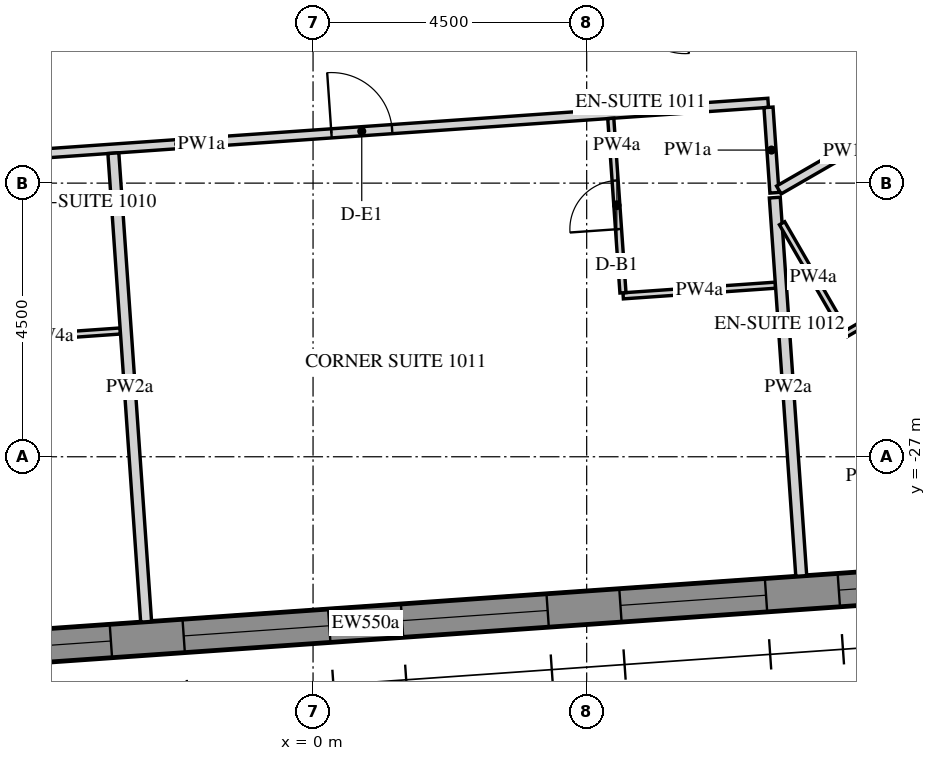
"""IFC4 building model, lengths in metres.
Left out: names, types, materials, properties, quantities, classifications, styles, units other than length and angle.
Written with IfcOpenShell. Run it as: python <this file> out.ifc"""

import sys

from ifc_helpers import new_model, si_unit, direction, frame, frame_2d, origin, place, context, subcontext, project, spatial, polyline, rectangle, outline, extrude, element, fill, save


model = new_model("IFC4")
c1 = context("Model", 3, precision=1e-05, world=origin(), true_north=direction((0.0, 1.0)))
c2 = subcontext(c1, "Body", "Model", "MODEL_VIEW")
j1 = project(units=[si_unit("LENGTHUNIT", "METRE"), si_unit("PLANEANGLEUNIT", "RADIAN")], contexts=[c1])
p1 = place(None, origin())
s1 = spatial("IfcSite", under=j1, at=p1, CompositionType="ELEMENT")
p2 = place(p1, origin())
s2 = spatial("IfcBuilding", under=s1, at=p2, CompositionType="ELEMENT")
p3 = place(p2, frame((0.0, 0.0, 142.8)))
s3 = spatial("IfcBuildingStorey", under=s2, at=p3, CompositionType="ELEMENT", Elevation=142.8)
p4 = place(p3, frame((-14.134, -30.786, -0.15), z_axis=(0.0, 0.0, 1.0), x_axis=(0.997564037441, 0.069756657061, 0.0)))
e1 = element("IfcWall", 1, at=p4, inside=s3, PredefinedType="SOLIDWALL", context=c2, shape_type="SweptSolid", body=[
    extrude(outline(polyline([(-0.026, -0.275), (30.094, -0.275), (30.049, 0.275), (0.026, 0.275), (-0.026, -0.275)])), origin(), (0.0, 0.0, 1.0), 3.75),
])
p5 = place(p4, frame((1.236, 0.0, 1.05)))
e2 = element("IfcOpeningElement", 2, at=p5, cuts=e1, PredefinedType="OPENING", context=c2, shape_type="SweptSolid", body=[
    extrude(rectangle(XDim=2.4, YDim=2.4, at=frame_2d((1.2, 1.2))), frame((0.0, 0.285, 0.0), z_axis=(0.0, -1.0, 0.0), x_axis=(1.0, 0.0, 0.0)), (0.0, 0.0, 1.0), 0.57),
])
p6 = place(p4, frame((4.835, 0.0, 1.05)))
e3 = element("IfcOpeningElement", 3, at=p6, cuts=e1, PredefinedType="OPENING", context=c2, shape_type="SweptSolid", body=[
    extrude(rectangle(XDim=2.4, YDim=2.4, at=frame_2d((1.2, 1.2))), frame((0.0, 0.285, 0.0), z_axis=(0.0, -1.0, 0.0), x_axis=(1.0, 0.0, 0.0)), (0.0, 0.0, 1.0), 0.57),
])
p7 = place(p4, frame((8.436, 0.0, 1.05)))
e4 = element("IfcOpeningElement", 4, at=p7, cuts=e1, PredefinedType="OPENING", context=c2, shape_type="SweptSolid", body=[
    extrude(rectangle(XDim=2.4, YDim=2.4, at=frame_2d((1.2, 1.2))), frame((0.0, 0.285, 0.0), z_axis=(0.0, -1.0, 0.0), x_axis=(1.0, 0.0, 0.0)), (0.0, 0.0, 1.0), 0.57),
])
p8 = place(p4, frame((12.035, 0.0, 1.05)))
e5 = element("IfcOpeningElement", 5, at=p8, cuts=e1, PredefinedType="OPENING", context=c2, shape_type="SweptSolid", body=[
    extrude(rectangle(XDim=2.4, YDim=2.4, at=frame_2d((1.2, 1.2))), frame((0.0, 0.285, 0.0), z_axis=(0.0, -1.0, 0.0), x_axis=(1.0, 0.0, 0.0)), (0.0, 0.0, 1.0), 0.57),
])
p9 = place(p4, frame((15.635, 0.0, 1.05)))
e6 = element("IfcOpeningElement", 6, at=p9, cuts=e1, PredefinedType="OPENING", context=c2, shape_type="SweptSolid", body=[
    extrude(rectangle(XDim=2.4, YDim=2.4, at=frame_2d((1.2, 1.2))), frame((0.0, 0.285, 0.0), z_axis=(0.0, -1.0, 0.0), x_axis=(1.0, 0.0, 0.0)), (0.0, 0.0, 1.0), 0.57),
])
p10 = place(p4, frame((19.236, 0.0, 1.05)))
e7 = element("IfcOpeningElement", 7, at=p10, cuts=e1, PredefinedType="OPENING", context=c2, shape_type="SweptSolid", body=[
    extrude(rectangle(XDim=2.4, YDim=2.4, at=frame_2d((1.2, 1.2))), frame((0.0, 0.285, 0.0), z_axis=(0.0, -1.0, 0.0), x_axis=(1.0, 0.0, 0.0)), (0.0, 0.0, 1.0), 0.57),
])
p11 = place(p4, frame((22.835, 0.0, 1.05)))
e8 = element("IfcOpeningElement", 8, at=p11, cuts=e1, PredefinedType="OPENING", context=c2, shape_type="SweptSolid", body=[
    extrude(rectangle(XDim=2.4, YDim=2.4, at=frame_2d((1.2, 1.2))), frame((0.0, 0.285, 0.0), z_axis=(0.0, -1.0, 0.0), x_axis=(1.0, 0.0, 0.0)), (0.0, 0.0, 1.0), 0.57),
])
p12 = place(p4, frame((26.436, 0.0, 1.05)))
e9 = element("IfcOpeningElement", 9, at=p12, cuts=e1, PredefinedType="OPENING", context=c2, shape_type="SweptSolid", body=[
    extrude(rectangle(XDim=2.4, YDim=2.4, at=frame_2d((1.2, 1.2))), frame((0.0, 0.285, 0.0), z_axis=(0.0, -1.0, 0.0), x_axis=(1.0, 0.0, 0.0)), (0.0, 0.0, 1.0), 0.57),
])
p13 = place(p3, frame((8.083, -14.0, -0.15), z_axis=(0.0, 0.0, 1.0), x_axis=(0.499997680643, -0.866026742862, 0.0)))
e10 = element("IfcWall", 10, at=p13, inside=s3, PredefinedType="SHEAR", context=c2, shape_type="SweptSolid", body=[
    extrude(rectangle(XDim=16.509, YDim=0.6, at=frame_2d((8.254, 0.0))), origin(), (0.0, 0.0, 1.0), 3.75),
])
p14 = place(p13, frame((7.354, 0.0, 0.15)))
e11 = element("IfcOpeningElement", 11, at=p14, cuts=e10, PredefinedType="OPENING", context=c2, shape_type="SweptSolid", body=[
    extrude(rectangle(XDim=1.8, YDim=2.4, at=frame_2d((0.9, 1.2))), frame((0.0, 0.31, 0.0), z_axis=(0.0, -1.0, 0.0), x_axis=(1.0, 0.0, 0.0)), (0.0, 0.0, 1.0), 0.62),
])
p15 = place(p3, frame((-11.902, -22.535, 0.0), z_axis=(0.0, 0.0, 1.0), x_axis=(0.997563830208, 0.069759620556, 0.0)))
e12 = element("IfcWall", 12, at=p15, inside=s3, PredefinedType="PARTITIONING", context=c2, shape_type="SweptSolid", body=[
    extrude(rectangle(XDim=19.434, YDim=0.15, at=frame_2d((9.717, 0.0))), origin(), (0.0, 0.0, 1.0), 2.838),
])
p16 = place(p15, frame((2.575, 0.0, 0.0)))
e13 = element("IfcOpeningElement", 13, at=p16, cuts=e12, PredefinedType="OPENING", context=c2, shape_type="SweptSolid", body=[
    extrude(rectangle(XDim=1.0, YDim=2.1, at=frame_2d((0.5, 1.05))), frame((0.0, 0.085, 0.0), z_axis=(0.0, -1.0, 0.0), x_axis=(1.0, 0.0, 0.0)), (0.0, 0.0, 1.0), 0.17),
])
p17 = place(p15, frame((12.234, 0.0, 0.0)))
e14 = element("IfcOpeningElement", 14, at=p17, cuts=e12, PredefinedType="OPENING", context=c2, shape_type="SweptSolid", body=[
    extrude(rectangle(XDim=1.0, YDim=2.1, at=frame_2d((0.5, 1.05))), frame((0.0, 0.085, 0.0), z_axis=(0.0, -1.0, 0.0), x_axis=(1.0, 0.0, 0.0)), (0.0, 0.0, 1.0), 0.17),
])
p18 = place(p3, frame((7.49, -21.254, 0.0), z_axis=(0.0, 0.0, 1.0), x_axis=(0.069718673592, -0.997566692784, 0.0)))
e15 = element("IfcWall", 15, at=p18, inside=s3, PredefinedType="PARTITIONING", context=c2, shape_type="SweptSolid", body=[
    extrude(rectangle(XDim=1.408, YDim=0.15, at=frame_2d((0.704, 0.0))), origin(), (0.0, 0.0, 1.0), 2.838),
])
p19 = place(p3, frame((7.66, -22.613, 0.0), z_axis=(0.0, 0.0, 1.0), x_axis=(0.866003870164, 0.500037295471, 0.0)))
e16 = element("IfcWall", 16, at=p19, inside=s3, PredefinedType="PARTITIONING", context=c2, shape_type="SweptSolid", body=[
    extrude(rectangle(XDim=2.573, YDim=0.15, at=frame_2d((1.287, 0.0))), origin(), (0.0, 0.0, 1.0), 2.838),
])
p20 = place(p3, frame((-0.825, -19.956, 0.0), z_axis=(0.0, 0.0, 1.0), x_axis=(-0.997562587881, -0.069777383582, 0.0)))
e17 = element("IfcWall", 17, at=p20, inside=s3, PredefinedType="PARTITIONING", context=c2, shape_type="SweptSolid", body=[
    extrude(rectangle(XDim=10.189, YDim=0.15, at=frame_2d((5.094, 0.0))), origin(), (0.0, 0.0, 1.0), 2.838),
])
p21 = place(p3, frame((-3.17, -24.932, 0.0), z_axis=(0.0, 0.0, 1.0), x_axis=(-0.997564338377, -0.069752353356, 0.0)))
e18 = element("IfcWall", 18, at=p21, inside=s3, PredefinedType="PARTITIONING", context=c2, shape_type="SweptSolid", body=[
    extrude(rectangle(XDim=2.31, YDim=0.1, at=frame_2d((1.155, 0.0))), origin(), (0.0, 0.0, 1.0), 2.838),
])
p22 = place(p3, frame((-2.745, -29.714, 0.0), z_axis=(0.0, 0.0, 1.0), x_axis=(-0.069748931501, 0.997564577636, 0.0)))
e19 = element("IfcWall", 19, at=p22, inside=s3, PredefinedType="PARTITIONING", context=c2, shape_type="SweptSolid", body=[
    extrude(rectangle(XDim=7.725, YDim=0.18, at=frame_2d((3.863, 0.0))), origin(), (0.0, 0.0, 1.0), 2.838),
])
p23 = place(p3, frame((7.604, -24.178, 0.0), z_axis=(0.0, 0.0, 1.0), x_axis=(-0.997565196586, -0.069740078583, 0.0)))
e20 = element("IfcWall", 20, at=p23, inside=s3, PredefinedType="PARTITIONING", context=c2, shape_type="SweptSolid", body=[
    extrude(rectangle(XDim=2.51, YDim=0.1, at=frame_2d((1.255, 0.0))), origin(), (0.0, 0.0, 1.0), 2.838),
])
p24 = place(p3, frame((5.097, -24.304, 0.0), z_axis=(0.0, 0.0, 1.0), x_axis=(-0.069804620828, 0.99756068232, 0.0)))
e21 = element("IfcWall", 21, at=p24, inside=s3, PredefinedType="PARTITIONING", context=c2, shape_type="SweptSolid", body=[
    extrude(rectangle(XDim=2.875, YDim=0.1, at=frame_2d((1.438, 0.0))), origin(), (0.0, 0.0, 1.0), 2.838),
])
p25 = place(p24, frame((1.05, 0.0, 0.0)))
e22 = element("IfcOpeningElement", 22, at=p25, cuts=e21, PredefinedType="OPENING", context=c2, shape_type="SweptSolid", body=[
    extrude(rectangle(XDim=0.8, YDim=2.1, at=frame_2d((0.4, 1.05))), frame((0.0, 0.06, 0.0), z_axis=(0.0, -1.0, 0.0), x_axis=(1.0, 0.0, 0.0)), (0.0, 0.0, 1.0), 0.12),
])
p26 = place(p3, frame((8.029, -28.96, 0.0), z_axis=(0.0, 0.0, 1.0), x_axis=(-0.069750446855, 0.997564471683, 0.0)))
e23 = element("IfcWall", 23, at=p26, inside=s3, PredefinedType="PARTITIONING", context=c2, shape_type="SweptSolid", body=[
    extrude(rectangle(XDim=6.237, YDim=0.18, at=frame_2d((3.119, 0.0))), origin(), (0.0, 0.0, 1.0), 2.838),
])
p27 = place(p3, frame((11.123, -23.616, 0.0), z_axis=(0.0, 0.0, 1.0), x_axis=(-0.866034909742, -0.499983534837, 0.0)))
e24 = element("IfcWall", 24, at=p27, inside=s3, PredefinedType="PARTITIONING", context=c2, shape_type="SweptSolid", body=[
    extrude(rectangle(XDim=2.725, YDim=0.1, at=frame_2d((1.363, 0.0))), origin(), (0.0, 0.0, 1.0), 2.838),
])
p28 = place(p27, frame((1.065, 0.0, 0.0)))
e25 = element("IfcOpeningElement", 25, at=p28, cuts=e24, PredefinedType="OPENING", context=c2, shape_type="SweptSolid", body=[
    extrude(rectangle(XDim=0.8, YDim=2.1, at=frame_2d((0.4, 1.05))), frame((0.0, 0.06, 0.0), z_axis=(0.0, -1.0, 0.0), x_axis=(1.0, 0.0, 0.0)), (0.0, 0.0, 1.0), 0.12),
])
p29 = place(p3, frame((8.738, -24.935, 0.0), z_axis=(0.0, 0.0, 1.0), x_axis=(-0.500045446624, 0.865999163574, 0.0)))
e26 = element("IfcWall", 26, at=p29, inside=s3, PredefinedType="PARTITIONING", context=c2, shape_type="SweptSolid", body=[
    extrude(rectangle(XDim=2.05, YDim=0.1, at=frame_2d((1.025, 0.0))), origin(), (0.0, 0.0, 1.0), 2.838),
])
p30 = place(p7, frame((0.0, 0.205, 0.0)))
e27 = element("IfcWindow", 27, at=p30, inside=s3, PartitioningType="DOUBLE_PANEL_VERTICAL", PredefinedType="WINDOW", context=c2, shape_type="SweptSolid", body=[
    extrude(rectangle(XDim=2.4, YDim=2.4, at=frame_2d((1.2, 1.2))), frame((0.0, 0.03, 0.0), z_axis=(0.0, -1.0, 0.0), x_axis=(1.0, 0.0, 0.0)), (0.0, 0.0, 1.0), 0.06),
])
fill(e4, e27)
p31 = place(p8, frame((0.0, 0.205, 0.0)))
e28 = element("IfcWindow", 28, at=p31, inside=s3, PartitioningType="DOUBLE_PANEL_VERTICAL", PredefinedType="WINDOW", context=c2, shape_type="SweptSolid", body=[
    extrude(rectangle(XDim=2.4, YDim=2.4, at=frame_2d((1.2, 1.2))), frame((0.0, 0.03, 0.0), z_axis=(0.0, -1.0, 0.0), x_axis=(1.0, 0.0, 0.0)), (0.0, 0.0, 1.0), 0.06),
])
fill(e5, e28)
p32 = place(p9, frame((0.0, 0.205, 0.0)))
e29 = element("IfcWindow", 29, at=p32, inside=s3, PartitioningType="DOUBLE_PANEL_VERTICAL", PredefinedType="WINDOW", context=c2, shape_type="SweptSolid", body=[
    extrude(rectangle(XDim=2.4, YDim=2.4, at=frame_2d((1.2, 1.2))), frame((0.0, 0.03, 0.0), z_axis=(0.0, -1.0, 0.0), x_axis=(1.0, 0.0, 0.0)), (0.0, 0.0, 1.0), 0.06),
])
fill(e6, e29)
p33 = place(p10, frame((0.0, 0.205, 0.0)))
e30 = element("IfcWindow", 30, at=p33, inside=s3, PartitioningType="DOUBLE_PANEL_VERTICAL", PredefinedType="WINDOW", context=c2, shape_type="SweptSolid", body=[
    extrude(rectangle(XDim=2.4, YDim=2.4, at=frame_2d((1.2, 1.2))), frame((0.0, 0.03, 0.0), z_axis=(0.0, -1.0, 0.0), x_axis=(1.0, 0.0, 0.0)), (0.0, 0.0, 1.0), 0.06),
])
fill(e7, e30)
p34 = place(p11, frame((0.0, 0.205, 0.0)))
e31 = element("IfcWindow", 31, at=p34, inside=s3, PartitioningType="DOUBLE_PANEL_VERTICAL", PredefinedType="WINDOW", context=c2, shape_type="SweptSolid", body=[
    extrude(rectangle(XDim=2.4, YDim=2.4, at=frame_2d((1.2, 1.2))), frame((0.0, 0.03, 0.0), z_axis=(0.0, -1.0, 0.0), x_axis=(1.0, 0.0, 0.0)), (0.0, 0.0, 1.0), 0.06),
])
fill(e8, e31)
p35 = place(p17, origin())
e32 = element("IfcDoor", 32, at=p35, inside=s3, OperationType="SINGLE_SWING_LEFT", PredefinedType="DOOR", context=c2, shape_type="SweptSolid", body=[
    extrude(rectangle(XDim=1.0, YDim=2.1, at=frame_2d((0.5, 1.05))), frame((0.0, 0.025, 0.0), z_axis=(0.0, -1.0, 0.0), x_axis=(1.0, 0.0, 0.0)), (0.0, 0.0, 1.0), 0.05),
])
fill(e14, e32)
p36 = place(p25, origin())
e33 = element("IfcDoor", 33, at=p36, inside=s3, OperationType="SINGLE_SWING_RIGHT", PredefinedType="DOOR", context=c2, shape_type="SweptSolid", body=[
    extrude(rectangle(XDim=0.8, YDim=2.1, at=frame_2d((0.4, 1.05))), frame((0.0, 0.025, 0.0), z_axis=(0.0, -1.0, 0.0), x_axis=(1.0, 0.0, 0.0)), (0.0, 0.0, 1.0), 0.05),
])
fill(e22, e33)
save(model, sys.argv[1])
